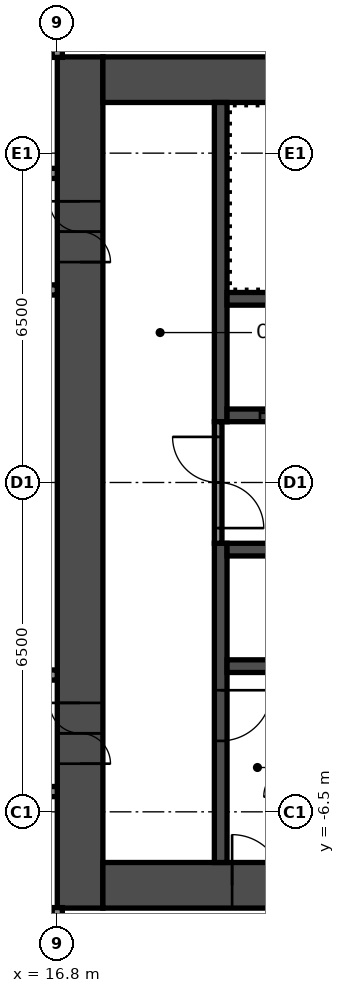
"""IFC4 building model, lengths in metres.
Left out: names, types, materials, properties, quantities, classifications, styles, units other than length and angle.
Written with IfcOpenShell. Run it as: python <this file> out.ifc"""

import sys

from ifc_helpers import new_model, si_unit, direction, frame, frame_2d, origin, place, context, subcontext, project, spatial, rectangle, extrude, element, fill, save


model = new_model("IFC4")
c1 = context("Model", 3, precision=1e-05, world=origin(), true_north=direction((0.0, 1.0)))
c2 = subcontext(c1, "Body", "Model", "MODEL_VIEW")
j1 = project(units=[si_unit("LENGTHUNIT", "METRE"), si_unit("PLANEANGLEUNIT", "RADIAN")], contexts=[c1])
p1 = place(None, origin())
s1 = spatial("IfcSite", under=j1, at=p1, CompositionType="ELEMENT")
p2 = place(p1, origin())
s2 = spatial("IfcBuilding", under=s1, at=p2, CompositionType="ELEMENT")
p3 = place(p2, frame((0.0, 0.0, 35.8)))
s3 = spatial("IfcBuildingStorey", under=s2, at=p3, CompositionType="ELEMENT", Elevation=35.8)
p4 = place(p3, frame((17.25, -8.4, 0.0), z_axis=(0.0, 0.0, 1.0), x_axis=(0.0, 1.0, 0.0)))
e1 = element("IfcWall", 1, at=p4, inside=s3, PredefinedType="SHEAR", context=c2, shape_type="SweptSolid", body=[
    extrude(rectangle(XDim=16.8, YDim=0.9, at=frame_2d((8.4, 0.0))), origin(), (0.0, 0.0, 1.0), 2.8),
])
p5 = place(p4, frame((12.75, 0.0, 0.0)))
e2 = element("IfcOpeningElement", 2, at=p5, cuts=e1, PredefinedType="OPENING", context=c2, shape_type="SweptSolid", body=[
    extrude(rectangle(XDim=1.2, YDim=2.1, at=frame_2d((0.6, 1.05))), frame((0.0, 0.46, 0.0), z_axis=(0.0, -1.0, 0.0), x_axis=(1.0, 0.0, 0.0)), (0.0, 0.0, 1.0), 0.92),
])
p6 = place(p4, frame((2.85, 0.0, 0.0)))
e3 = element("IfcOpeningElement", 3, at=p6, cuts=e1, PredefinedType="OPENING", context=c2, shape_type="SweptSolid", body=[
    extrude(rectangle(XDim=1.2, YDim=2.1, at=frame_2d((0.6, 1.05))), frame((0.0, 0.46, 0.0), z_axis=(0.0, -1.0, 0.0), x_axis=(1.0, 0.0, 0.0)), (0.0, 0.0, 1.0), 0.92),
])
p7 = place(p3, frame((17.7, 7.95, 0.0), z_axis=(0.0, 0.0, 1.0), x_axis=(1.0, 0.0, 0.0)))
e4 = element("IfcWall", 4, at=p7, inside=s3, PredefinedType="SHEAR", context=c2, shape_type="SweptSolid", body=[
    extrude(rectangle(XDim=15.0, YDim=0.9, at=frame_2d((7.5, 0.0))), origin(), (0.0, 0.0, 1.0), 2.8),
])
p8 = place(p7, frame((10.4, 0.0, 0.0)))
e5 = element("IfcOpeningElement", 5, at=p8, cuts=e4, PredefinedType="OPENING", context=c2, shape_type="SweptSolid", body=[
    extrude(rectangle(XDim=1.2, YDim=2.1, at=frame_2d((0.6, 1.05))), frame((0.0, 0.46, 0.0), z_axis=(0.0, -1.0, 0.0), x_axis=(1.0, 0.0, 0.0)), (0.0, 0.0, 1.0), 0.92),
])
p9 = place(p7, frame((13.35, 0.0, 0.0)))
e6 = element("IfcOpeningElement", 6, at=p9, cuts=e4, PredefinedType="OPENING", context=c2, shape_type="SweptSolid", body=[
    extrude(rectangle(XDim=0.9, YDim=2.1, at=frame_2d((0.45, 1.05))), frame((0.0, 0.46, 0.0), z_axis=(0.0, -1.0, 0.0), x_axis=(1.0, 0.0, 0.0)), (0.0, 0.0, 1.0), 0.92),
])
p10 = place(p3, frame((17.7, -7.95, 0.0), z_axis=(0.0, 0.0, 1.0), x_axis=(1.0, 0.0, 0.0)))
e7 = element("IfcWall", 7, at=p10, inside=s3, PredefinedType="SHEAR", context=c2, shape_type="SweptSolid", body=[
    extrude(rectangle(XDim=15.0, YDim=0.9, at=frame_2d((7.5, 0.0))), origin(), (0.0, 0.0, 1.0), 2.8),
])
p11 = place(p10, frame((2.55, 0.0, 0.0)))
e8 = element("IfcOpeningElement", 8, at=p11, cuts=e7, PredefinedType="OPENING", context=c2, shape_type="SweptSolid", body=[
    extrude(rectangle(XDim=1.0, YDim=2.1, at=frame_2d((0.5, 1.05))), frame((0.0, 0.46, 0.0), z_axis=(0.0, -1.0, 0.0), x_axis=(1.0, 0.0, 0.0)), (0.0, 0.0, 1.0), 0.92),
])
p12 = place(p3, frame((20.025, 1.2, 0.0), z_axis=(0.0, 0.0, 1.0), x_axis=(0.0, 1.0, 0.0)))
e9 = element("IfcWall", 9, at=p12, inside=s3, PredefinedType="SHEAR", context=c2, shape_type="SweptSolid", body=[
    extrude(rectangle(XDim=6.3, YDim=0.25, at=frame_2d((3.15, 0.0))), origin(), (0.0, 0.0, 1.0), 2.8),
])
p13 = place(p3, frame((20.025, -7.5, 0.0), z_axis=(0.0, 0.0, 1.0), x_axis=(0.0, 1.0, 0.0)))
e10 = element("IfcWall", 10, at=p13, inside=s3, PredefinedType="SHEAR", context=c2, shape_type="SweptSolid", body=[
    extrude(rectangle(XDim=6.3, YDim=0.25, at=frame_2d((3.15, 0.0))), origin(), (0.0, 0.0, 1.0), 2.8),
])
p14 = place(p13, frame((2.4, 0.0, 0.0)))
e11 = element("IfcOpeningElement", 11, at=p14, cuts=e10, PredefinedType="OPENING", context=c2, shape_type="SweptSolid", body=[
    extrude(rectangle(XDim=1.0, YDim=2.1, at=frame_2d((0.5, 1.05))), frame((0.0, 0.135, 0.0), z_axis=(0.0, -1.0, 0.0), x_axis=(1.0, 0.0, 0.0)), (0.0, 0.0, 1.0), 0.27),
])
p15 = place(p3, frame((20.15, 1.325, 0.0), z_axis=(0.0, 0.0, 1.0), x_axis=(1.0, 0.0, 0.0)))
e12 = element("IfcWall", 12, at=p15, inside=s3, PredefinedType="SHEAR", context=c2, shape_type="SweptSolid", body=[
    extrude(rectangle(XDim=7.5, YDim=0.25, at=frame_2d((3.75, 0.0))), origin(), (0.0, 0.0, 1.0), 2.8),
])
p16 = place(p15, frame((0.65, 0.0, 0.0)))
e13 = element("IfcOpeningElement", 13, at=p16, cuts=e12, PredefinedType="OPENING", context=c2, shape_type="SweptSolid", body=[
    extrude(rectangle(XDim=1.1, YDim=2.1, at=frame_2d((0.55, 1.05))), frame((0.0, 0.135, 0.0), z_axis=(0.0, -1.0, 0.0), x_axis=(1.0, 0.0, 0.0)), (0.0, 0.0, 1.0), 0.27),
])
p17 = place(p15, frame((3.05, 0.0, 0.0)))
e14 = element("IfcOpeningElement", 14, at=p17, cuts=e12, PredefinedType="OPENING", context=c2, shape_type="SweptSolid", body=[
    extrude(rectangle(XDim=1.1, YDim=2.1, at=frame_2d((0.55, 1.05))), frame((0.0, 0.135, 0.0), z_axis=(0.0, -1.0, 0.0), x_axis=(1.0, 0.0, 0.0)), (0.0, 0.0, 1.0), 0.27),
])
p18 = place(p15, frame((5.45, 0.0, 0.0)))
e15 = element("IfcOpeningElement", 15, at=p18, cuts=e12, PredefinedType="OPENING", context=c2, shape_type="SweptSolid", body=[
    extrude(rectangle(XDim=1.1, YDim=2.1, at=frame_2d((0.55, 1.05))), frame((0.0, 0.135, 0.0), z_axis=(0.0, -1.0, 0.0), x_axis=(1.0, 0.0, 0.0)), (0.0, 0.0, 1.0), 0.27),
])
for number, where, z_axis, x_axis in (
    (16, (20.15, 3.625, 0.0), (0.0, 0.0, 1.0), (1.0, 0.0, 0.0)),
    (17, (20.15, -1.325, 0.0), (0.0, 0.0, 1.0), (1.0, 0.0, 0.0)),
    (18, (20.15, -3.625, 0.0), (0.0, 0.0, 1.0), (1.0, 0.0, 0.0)),
):
    element("IfcWall", number, at=place(p3, frame(where, z_axis=z_axis, x_axis=x_axis)), inside=s3, PredefinedType="SHEAR", context=c2, shape_type="SweptSolid", body=[
        extrude(rectangle(XDim=7.5, YDim=0.25, at=frame_2d((3.75, 0.0))), origin(), (0.0, 0.0, 1.0), 2.8),
    ])
p19 = place(p3, frame((19.975, -1.2, 0.0), z_axis=(0.0, 0.0, 1.0), x_axis=(0.0, 1.0, 0.0)))
e19 = element("IfcWall", 19, at=p19, inside=s3, PredefinedType="PARTITIONING", context=c2, shape_type="SweptSolid", body=[
    extrude(rectangle(XDim=2.4, YDim=0.15, at=frame_2d((1.2, 0.0))), origin(), (0.0, 0.0, 1.0), 2.8),
])
p20 = place(p19, frame((0.3, 0.0, 0.0)))
e20 = element("IfcOpeningElement", 20, at=p20, cuts=e19, PredefinedType="OPENING", context=c2, shape_type="SweptSolid", body=[
    extrude(rectangle(XDim=1.8, YDim=2.1, at=frame_2d((0.9, 1.05))), frame((0.0, 0.085, 0.0), z_axis=(0.0, -1.0, 0.0), x_axis=(1.0, 0.0, 0.0)), (0.0, 0.0, 1.0), 0.17),
])
p21 = place(p3, frame((-16.8, -6.1, 0.0), z_axis=(0.0, 0.0, 1.0), x_axis=(1.0, 0.0, 0.0)))
e21 = element("IfcWall", 21, at=p21, inside=s3, PredefinedType="PARTITIONING", context=c2, shape_type="SweptSolid", body=[
    extrude(rectangle(XDim=33.6, YDim=0.2, at=frame_2d((16.8, 0.0))), origin(), (0.0, 0.0, 1.0), 2.8),
])
p22 = place(p21, frame((5.4, 0.0, 0.0)))
e22 = element("IfcOpeningElement", 22, at=p22, cuts=e21, PredefinedType="OPENING", context=c2, shape_type="SweptSolid", body=[
    extrude(rectangle(XDim=1.0, YDim=2.1, at=frame_2d((0.5, 1.05))), frame((0.0, 0.11, 0.0), z_axis=(0.0, -1.0, 0.0), x_axis=(1.0, 0.0, 0.0)), (0.0, 0.0, 1.0), 0.22),
])
p23 = place(p21, frame((9.545, 0.0, 0.0)))
e23 = element("IfcOpeningElement", 23, at=p23, cuts=e21, PredefinedType="OPENING", context=c2, shape_type="SweptSolid", body=[
    extrude(rectangle(XDim=0.9, YDim=2.1, at=frame_2d((0.45, 1.05))), frame((0.0, 0.11, 0.0), z_axis=(0.0, -1.0, 0.0), x_axis=(1.0, 0.0, 0.0)), (0.0, 0.0, 1.0), 0.22),
])
p24 = place(p21, frame((13.745, 0.0, 0.0)))
e24 = element("IfcOpeningElement", 24, at=p24, cuts=e21, PredefinedType="OPENING", context=c2, shape_type="SweptSolid", body=[
    extrude(rectangle(XDim=0.9, YDim=2.1, at=frame_2d((0.45, 1.05))), frame((0.0, 0.11, 0.0), z_axis=(0.0, -1.0, 0.0), x_axis=(1.0, 0.0, 0.0)), (0.0, 0.0, 1.0), 0.22),
])
p25 = place(p21, frame((22.2, 0.0, 0.0)))
e25 = element("IfcOpeningElement", 25, at=p25, cuts=e21, PredefinedType="OPENING", context=c2, shape_type="SweptSolid", body=[
    extrude(rectangle(XDim=1.0, YDim=2.1, at=frame_2d((0.5, 1.05))), frame((0.0, 0.11, 0.0), z_axis=(0.0, -1.0, 0.0), x_axis=(1.0, 0.0, 0.0)), (0.0, 0.0, 1.0), 0.22),
])
p26 = place(p21, frame((30.6, 0.0, 0.0)))
e26 = element("IfcOpeningElement", 26, at=p26, cuts=e21, PredefinedType="OPENING", context=c2, shape_type="SweptSolid", body=[
    extrude(rectangle(XDim=1.0, YDim=2.1, at=frame_2d((0.5, 1.05))), frame((0.0, 0.11, 0.0), z_axis=(0.0, -1.0, 0.0), x_axis=(1.0, 0.0, 0.0)), (0.0, 0.0, 1.0), 0.22),
])
p27 = place(p3, frame((-16.8, -3.8, 0.0), z_axis=(0.0, 0.0, 1.0), x_axis=(1.0, 0.0, 0.0)))
e27 = element("IfcWall", 27, at=p27, inside=s3, PredefinedType="PARTITIONING", context=c2, shape_type="SweptSolid", body=[
    extrude(rectangle(XDim=33.6, YDim=0.2, at=frame_2d((16.8, 0.0))), origin(), (0.0, 0.0, 1.0), 2.8),
])
p28 = place(p27, frame((9.8, 0.0, 0.0)))
e28 = element("IfcOpeningElement", 28, at=p28, cuts=e27, PredefinedType="OPENING", context=c2, shape_type="SweptSolid", body=[
    extrude(rectangle(XDim=0.9, YDim=2.1, at=frame_2d((0.45, 1.05))), frame((0.0, 0.11, 0.0), z_axis=(0.0, -1.0, 0.0), x_axis=(1.0, 0.0, 0.0)), (0.0, 0.0, 1.0), 0.22),
])
p29 = place(p27, frame((14.0, 0.0, 0.0)))
e29 = element("IfcOpeningElement", 29, at=p29, cuts=e27, PredefinedType="OPENING", context=c2, shape_type="SweptSolid", body=[
    extrude(rectangle(XDim=0.9, YDim=2.1, at=frame_2d((0.45, 1.05))), frame((0.0, 0.11, 0.0), z_axis=(0.0, -1.0, 0.0), x_axis=(1.0, 0.0, 0.0)), (0.0, 0.0, 1.0), 0.22),
])
p30 = place(p27, frame((27.355, 0.0, 0.0)))
e30 = element("IfcOpeningElement", 30, at=p30, cuts=e27, PredefinedType="OPENING", context=c2, shape_type="SweptSolid", body=[
    extrude(rectangle(XDim=0.9, YDim=2.1, at=frame_2d((0.45, 1.05))), frame((0.0, 0.11, 0.0), z_axis=(0.0, -1.0, 0.0), x_axis=(1.0, 0.0, 0.0)), (0.0, 0.0, 1.0), 0.22),
])
p31 = place(p27, frame((31.555, 0.0, 0.0)))
e31 = element("IfcOpeningElement", 31, at=p31, cuts=e27, PredefinedType="OPENING", context=c2, shape_type="SweptSolid", body=[
    extrude(rectangle(XDim=0.9, YDim=2.1, at=frame_2d((0.45, 1.05))), frame((0.0, 0.11, 0.0), z_axis=(0.0, -1.0, 0.0), x_axis=(1.0, 0.0, 0.0)), (0.0, 0.0, 1.0), 0.22),
])
p32 = place(p3, frame((-16.8, 3.8, 0.0), z_axis=(0.0, 0.0, 1.0), x_axis=(1.0, 0.0, 0.0)))
e32 = element("IfcWall", 32, at=p32, inside=s3, PredefinedType="PARTITIONING", context=c2, shape_type="SweptSolid", body=[
    extrude(rectangle(XDim=33.6, YDim=0.2, at=frame_2d((16.8, 0.0))), origin(), (0.0, 0.0, 1.0), 2.8),
])
p33 = place(p32, frame((1.9, 0.0, 0.0)))
e33 = element("IfcOpeningElement", 33, at=p33, cuts=e32, PredefinedType="OPENING", context=c2, shape_type="SweptSolid", body=[
    extrude(rectangle(XDim=0.9, YDim=2.1, at=frame_2d((0.45, 1.05))), frame((0.0, 0.11, 0.0), z_axis=(0.0, -1.0, 0.0), x_axis=(1.0, 0.0, 0.0)), (0.0, 0.0, 1.0), 0.22),
])
p34 = place(p32, frame((6.1, 0.0, 0.0)))
e34 = element("IfcOpeningElement", 34, at=p34, cuts=e32, PredefinedType="OPENING", context=c2, shape_type="SweptSolid", body=[
    extrude(rectangle(XDim=0.9, YDim=2.1, at=frame_2d((0.45, 1.05))), frame((0.0, 0.11, 0.0), z_axis=(0.0, -1.0, 0.0), x_axis=(1.0, 0.0, 0.0)), (0.0, 0.0, 1.0), 0.22),
])
p35 = place(p32, frame((18.115, 0.0, 0.0)))
e35 = element("IfcOpeningElement", 35, at=p35, cuts=e32, PredefinedType="OPENING", context=c2, shape_type="SweptSolid", body=[
    extrude(rectangle(XDim=0.9, YDim=2.1, at=frame_2d((0.45, 1.05))), frame((0.0, 0.11, 0.0), z_axis=(0.0, -1.0, 0.0), x_axis=(1.0, 0.0, 0.0)), (0.0, 0.0, 1.0), 0.22),
])
p36 = place(p32, frame((22.315, 0.0, 0.0)))
e36 = element("IfcOpeningElement", 36, at=p36, cuts=e32, PredefinedType="OPENING", context=c2, shape_type="SweptSolid", body=[
    extrude(rectangle(XDim=0.9, YDim=2.1, at=frame_2d((0.45, 1.05))), frame((0.0, 0.11, 0.0), z_axis=(0.0, -1.0, 0.0), x_axis=(1.0, 0.0, 0.0)), (0.0, 0.0, 1.0), 0.22),
])
p37 = place(p3, frame((-16.8, 6.1, 0.0), z_axis=(0.0, 0.0, 1.0), x_axis=(1.0, 0.0, 0.0)))
e37 = element("IfcWall", 37, at=p37, inside=s3, PredefinedType="PARTITIONING", context=c2, shape_type="SweptSolid", body=[
    extrude(rectangle(XDim=33.6, YDim=0.2, at=frame_2d((16.8, 0.0))), origin(), (0.0, 0.0, 1.0), 2.8),
])
p38 = place(p37, frame((1.9, 0.0, 0.0)))
e38 = element("IfcOpeningElement", 38, at=p38, cuts=e37, PredefinedType="OPENING", context=c2, shape_type="SweptSolid", body=[
    extrude(rectangle(XDim=1.0, YDim=2.1, at=frame_2d((0.5, 1.05))), frame((0.0, 0.11, 0.0), z_axis=(0.0, -1.0, 0.0), x_axis=(1.0, 0.0, 0.0)), (0.0, 0.0, 1.0), 0.22),
])
p39 = place(p37, frame((9.63, 0.0, 0.0)))
e39 = element("IfcOpeningElement", 39, at=p39, cuts=e37, PredefinedType="OPENING", context=c2, shape_type="SweptSolid", body=[
    extrude(rectangle(XDim=0.9, YDim=2.1, at=frame_2d((0.45, 1.05))), frame((0.0, 0.11, 0.0), z_axis=(0.0, -1.0, 0.0), x_axis=(1.0, 0.0, 0.0)), (0.0, 0.0, 1.0), 0.22),
])
p40 = place(p37, frame((13.83, 0.0, 0.0)))
e40 = element("IfcOpeningElement", 40, at=p40, cuts=e37, PredefinedType="OPENING", context=c2, shape_type="SweptSolid", body=[
    extrude(rectangle(XDim=0.9, YDim=2.1, at=frame_2d((0.45, 1.05))), frame((0.0, 0.11, 0.0), z_axis=(0.0, -1.0, 0.0), x_axis=(1.0, 0.0, 0.0)), (0.0, 0.0, 1.0), 0.22),
])
p41 = place(p37, frame((18.785, 0.0, 0.0)))
e41 = element("IfcOpeningElement", 41, at=p41, cuts=e37, PredefinedType="OPENING", context=c2, shape_type="SweptSolid", body=[
    extrude(rectangle(XDim=0.9, YDim=2.1, at=frame_2d((0.45, 1.05))), frame((0.0, 0.11, 0.0), z_axis=(0.0, -1.0, 0.0), x_axis=(1.0, 0.0, 0.0)), (0.0, 0.0, 1.0), 0.22),
])
p42 = place(p37, frame((22.985, 0.0, 0.0)))
e42 = element("IfcOpeningElement", 42, at=p42, cuts=e37, PredefinedType="OPENING", context=c2, shape_type="SweptSolid", body=[
    extrude(rectangle(XDim=0.9, YDim=2.1, at=frame_2d((0.45, 1.05))), frame((0.0, 0.11, 0.0), z_axis=(0.0, -1.0, 0.0), x_axis=(1.0, 0.0, 0.0)), (0.0, 0.0, 1.0), 0.22),
])
p43 = place(p37, frame((27.2, 0.0, 0.0)))
e43 = element("IfcOpeningElement", 43, at=p43, cuts=e37, PredefinedType="OPENING", context=c2, shape_type="SweptSolid", body=[
    extrude(rectangle(XDim=1.0, YDim=2.1, at=frame_2d((0.5, 1.05))), frame((0.0, 0.11, 0.0), z_axis=(0.0, -1.0, 0.0), x_axis=(1.0, 0.0, 0.0)), (0.0, 0.0, 1.0), 0.22),
])
for number, where, z_axis, x_axis in (
    (44, (16.8, -20.3, 0.0), (0.0, 0.0, 1.0), (0.0, 1.0, 0.0)),
    (45, (16.8, 8.39, 0.0), (0.0, 0.0, 1.0), (0.0, 1.0, 0.0)),
):
    element("IfcWall", number, at=place(p3, frame(where, z_axis=z_axis, x_axis=x_axis)), inside=s3, PredefinedType="PARTITIONING", context=c2, shape_type="SweptSolid", body=[
        extrude(rectangle(XDim=11.91, YDim=0.2, at=frame_2d((5.955, 0.0))), origin(), (0.0, 0.0, 1.0), 2.8),
    ])
p44 = place(p5, origin())
e46 = element("IfcDoor", 46, at=p44, inside=s3, OperationType="DOUBLE_DOOR_SINGLE_SWING", PredefinedType="DOOR", context=c2, shape_type="SweptSolid", body=[
    extrude(rectangle(XDim=1.2, YDim=2.1, at=frame_2d((0.6, 1.05))), frame((0.0, 0.025, 0.0), z_axis=(0.0, -1.0, 0.0), x_axis=(1.0, 0.0, 0.0)), (0.0, 0.0, 1.0), 0.05),
])
fill(e2, e46)
p45 = place(p6, origin())
e47 = element("IfcDoor", 47, at=p45, inside=s3, OperationType="DOUBLE_DOOR_SINGLE_SWING", PredefinedType="DOOR", context=c2, shape_type="SweptSolid", body=[
    extrude(rectangle(XDim=1.2, YDim=2.1, at=frame_2d((0.6, 1.05))), frame((0.0, 0.025, 0.0), z_axis=(0.0, -1.0, 0.0), x_axis=(1.0, 0.0, 0.0)), (0.0, 0.0, 1.0), 0.05),
])
fill(e3, e47)
p46 = place(p11, origin())
e48 = element("IfcDoor", 48, at=p46, inside=s3, OperationType="SINGLE_SWING_RIGHT", PredefinedType="DOOR", context=c2, shape_type="SweptSolid", body=[
    extrude(rectangle(XDim=1.0, YDim=2.1, at=frame_2d((0.5, 1.05))), frame((0.0, 0.025, 0.0), z_axis=(0.0, -1.0, 0.0), x_axis=(1.0, 0.0, 0.0)), (0.0, 0.0, 1.0), 0.05),
])
fill(e8, e48)
p47 = place(p14, origin())
e49 = element("IfcDoor", 49, at=p47, inside=s3, OperationType="SINGLE_SWING_RIGHT", PredefinedType="DOOR", context=c2, shape_type="SweptSolid", body=[
    extrude(rectangle(XDim=1.0, YDim=2.1, at=frame_2d((0.5, 1.05))), frame((0.0, 0.025, 0.0), z_axis=(0.0, -1.0, 0.0), x_axis=(1.0, 0.0, 0.0)), (0.0, 0.0, 1.0), 0.05),
])
fill(e11, e49)
p48 = place(p20, origin())
e50 = element("IfcDoor", 50, at=p48, inside=s3, OperationType="DOUBLE_DOOR_SINGLE_SWING", PredefinedType="DOOR", context=c2, shape_type="SweptSolid", body=[
    extrude(rectangle(XDim=1.8, YDim=2.1, at=frame_2d((0.9, 1.05))), frame((0.0, 0.025, 0.0), z_axis=(0.0, -1.0, 0.0), x_axis=(1.0, 0.0, 0.0)), (0.0, 0.0, 1.0), 0.05),
])
fill(e20, e50)
p49 = place(p16, origin())
e51 = element("IfcDoor", 51, at=p49, inside=s3, OperationType="DOUBLE_DOOR_SLIDING", PredefinedType="DOOR", context=c2, shape_type="SweptSolid", body=[
    extrude(rectangle(XDim=1.1, YDim=2.1, at=frame_2d((0.55, 1.05))), frame((0.0, 0.025, 0.0), z_axis=(0.0, -1.0, 0.0), x_axis=(1.0, 0.0, 0.0)), (0.0, 0.0, 1.0), 0.05),
])
fill(e13, e51)
save(model, sys.argv[1])
